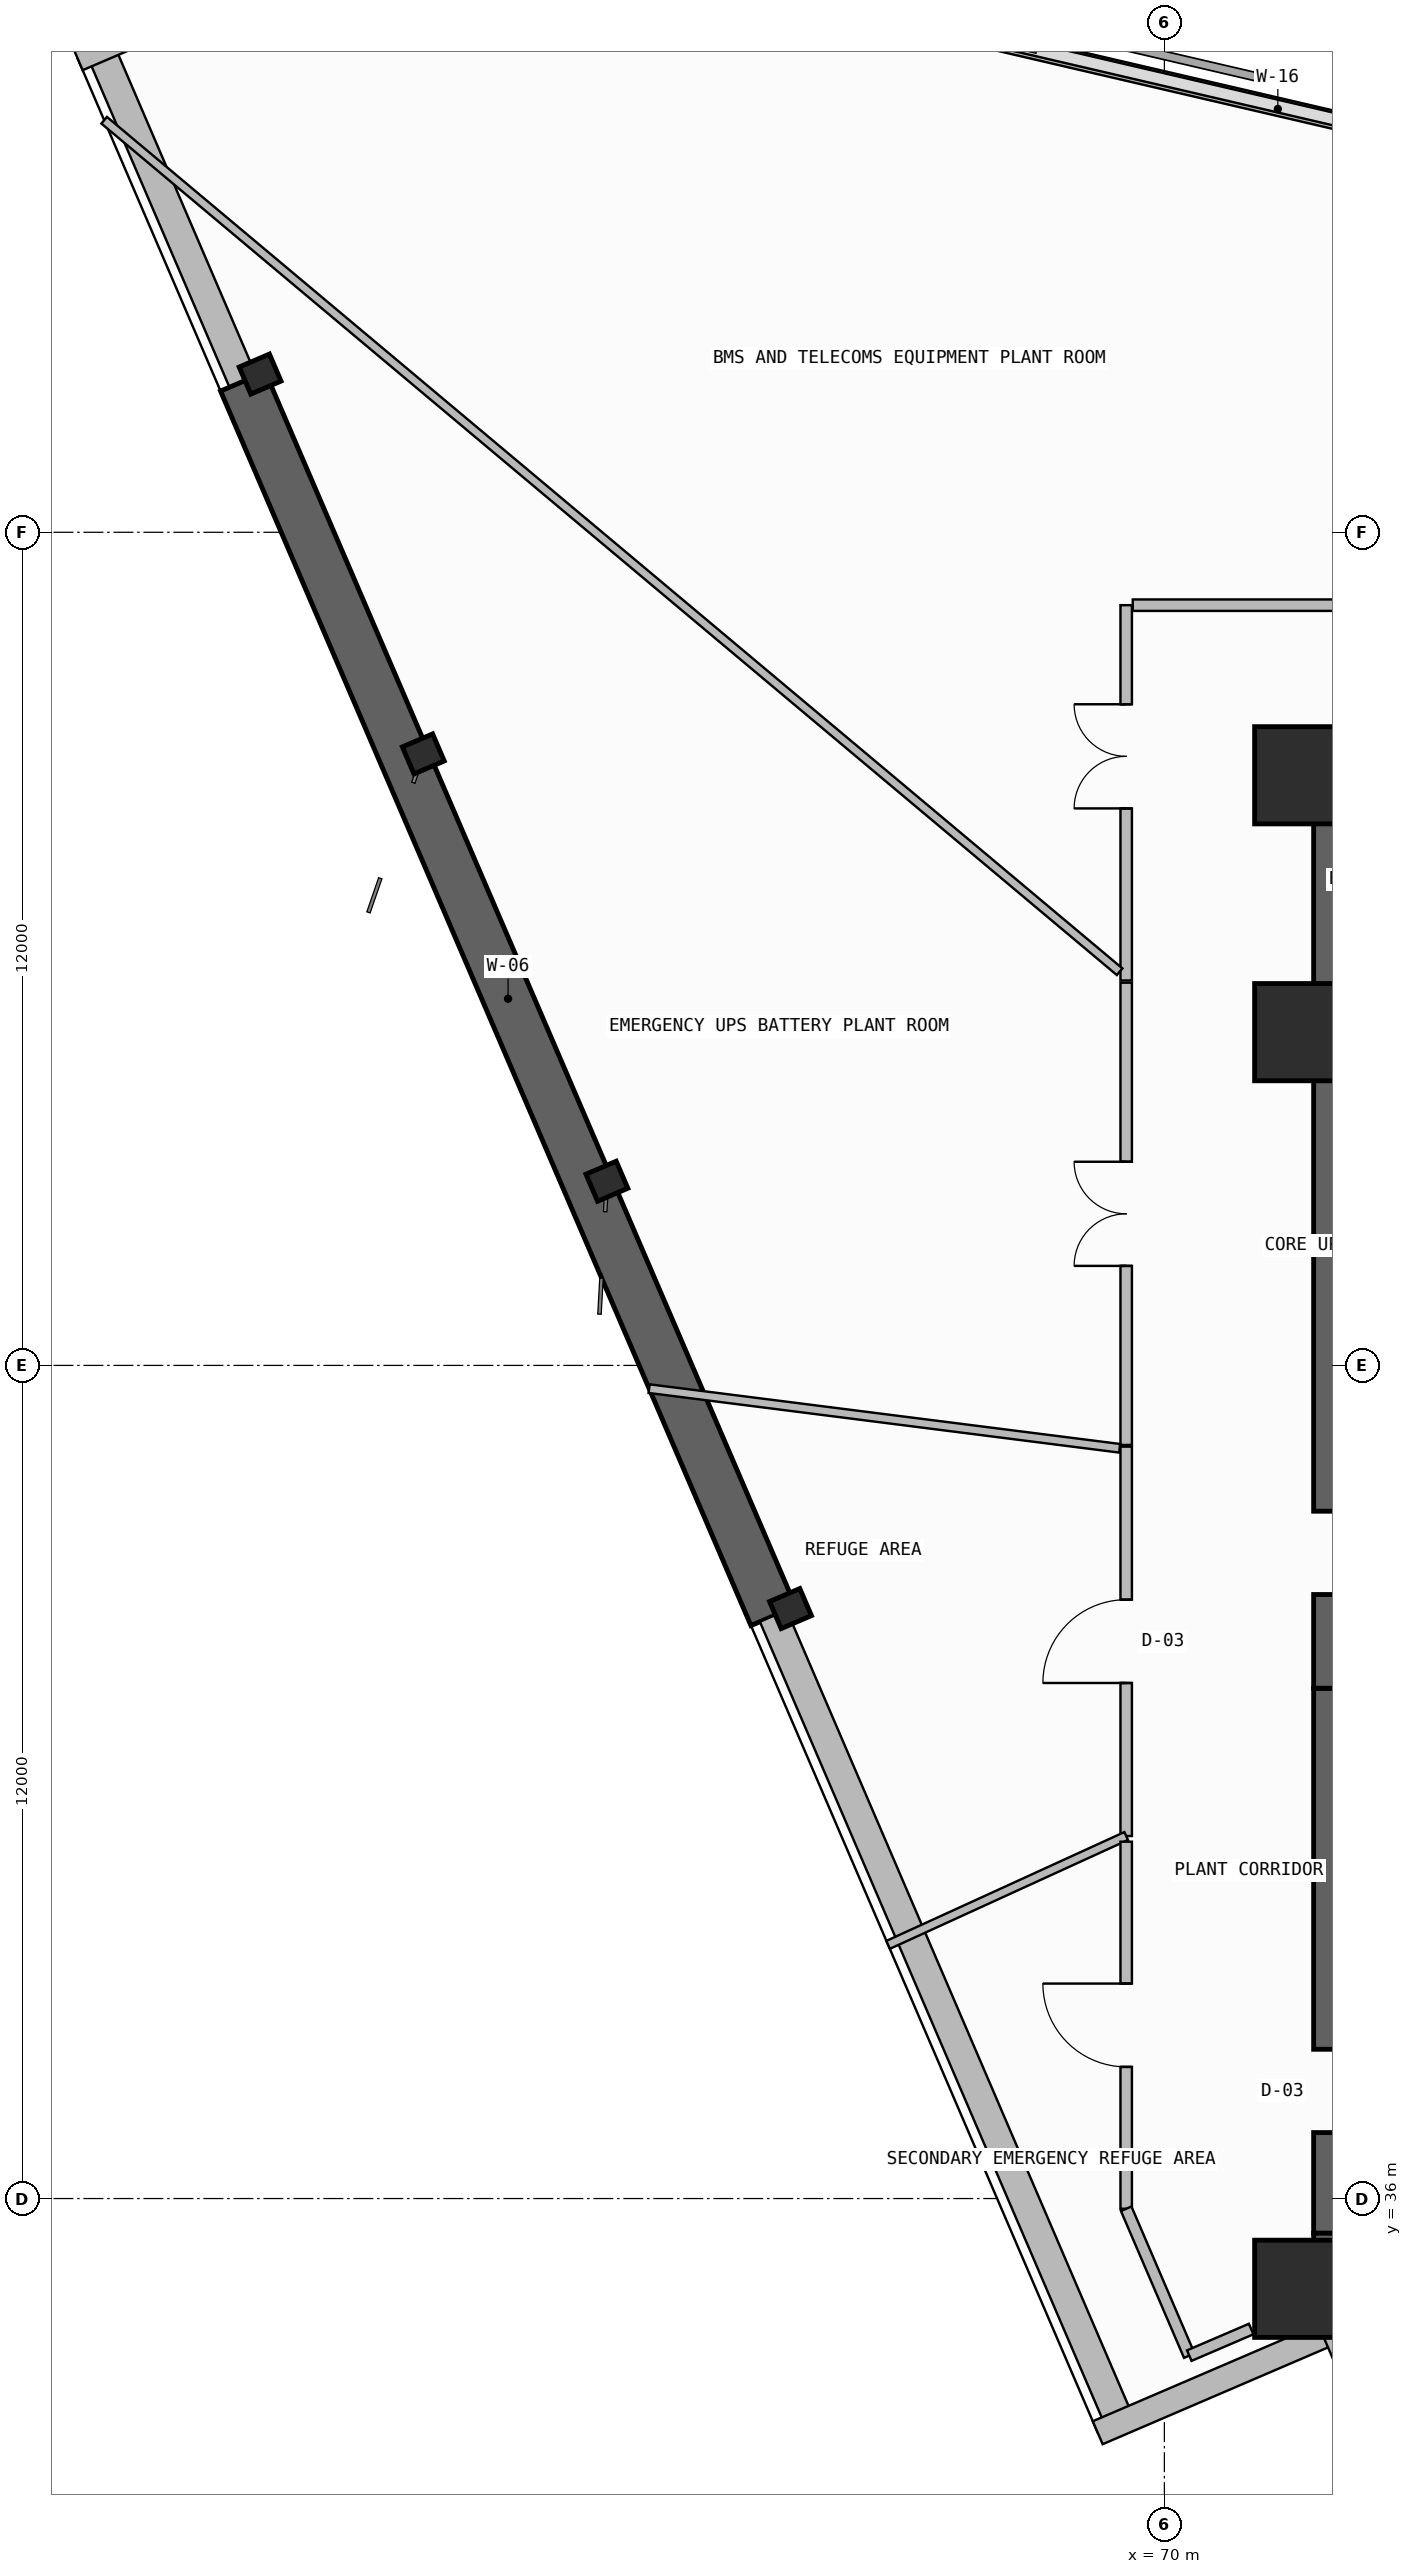
"""IFC4 building model, lengths in metres.
Left out: names, types, materials, properties, quantities, classifications, styles, units other than length and angle.
Written with IfcOpenShell. Run it as: python <this file> out.ifc"""

import sys

from ifc_helpers import new_model, si_unit, direction, frame, frame_2d, origin, origin_2d, place, context, subcontext, project, spatial, rectangle, i_section, extrude, element, fill, save


model = new_model("IFC4")
c1 = context("Model", 3, precision=1e-05, world=origin(), true_north=direction((0.0, 1.0)))
c2 = subcontext(c1, "Body", "Model", "MODEL_VIEW")
j1 = project(units=[si_unit("LENGTHUNIT", "METRE"), si_unit("PLANEANGLEUNIT", "RADIAN")], contexts=[c1])
p1 = place(None, origin())
s1 = spatial("IfcSite", under=j1, at=p1, CompositionType="ELEMENT")
p2 = place(p1, origin())
s2 = spatial("IfcBuilding", under=s1, at=p2, CompositionType="ELEMENT")
p3 = place(p2, frame((0.0, 0.0, 196.7)))
s3 = spatial("IfcBuildingStorey", under=s2, at=p3, CompositionType="ELEMENT", Elevation=196.7)
p4 = place(p3, frame((72.525, 35.5, -0.5), z_axis=(0.0, 0.0, 1.0), x_axis=(0.0, 1.0, 0.0)))
e1 = element("IfcWall", 1, at=p4, inside=s3, PredefinedType="SHEAR", context=c2, shape_type="SweptSolid", body=[
    extrude(rectangle(XDim=7.85, YDim=0.75, at=frame_2d((3.925, 0.0))), origin(), (0.0, 0.0, 1.0), 4.3),
])
p5 = place(p4, frame((1.45, 0.0, 0.5)))
e2 = element("IfcOpeningElement", 2, at=p5, cuts=e1, PredefinedType="OPENING", context=c2, shape_type="SweptSolid", body=[
    extrude(rectangle(XDim=1.2, YDim=2.2, at=frame_2d((0.6, 1.1))), frame((0.0, 0.385, 0.0), z_axis=(0.0, -1.0, 0.0), x_axis=(1.0, 0.0, 0.0)), (0.0, 0.0, 1.0), 0.77),
])
p6 = place(p3, frame((72.15, 35.125, -0.5), z_axis=(0.0, 0.0, 1.0), x_axis=(1.0, 0.0, 0.0)))
e3 = element("IfcWall", 3, at=p6, inside=s3, PredefinedType="SHEAR", context=c2, shape_type="SweptSolid", body=[
    extrude(rectangle(XDim=13.6, YDim=0.75, at=frame_2d((6.8, 0.0))), origin(), (0.0, 0.0, 1.0), 4.3),
])
p7 = place(p3, frame((72.525, 43.35, -0.5), z_axis=(0.0, 0.0, 1.0), x_axis=(0.0, 1.0, 0.0)))
e4 = element("IfcWall", 4, at=p7, inside=s3, PredefinedType="SHEAR", context=c2, shape_type="SweptSolid", body=[
    extrude(rectangle(XDim=12.7, YDim=0.75, at=frame_2d((6.35, 0.0))), origin(), (0.0, 0.0, 1.0), 4.3),
])
p8 = place(p7, frame((1.35, 0.0, 0.5)))
e5 = element("IfcOpeningElement", 5, at=p8, cuts=e4, PredefinedType="OPENING", context=c2, shape_type="SweptSolid", body=[
    extrude(rectangle(XDim=1.2, YDim=2.2, at=frame_2d((0.6, 1.1))), frame((0.0, 0.385, 0.0), z_axis=(0.0, -1.0, 0.0), x_axis=(1.0, 0.0, 0.0)), (0.0, 0.0, 1.0), 0.77),
])
p9 = place(p3, frame((72.0, 56.425, -0.5), z_axis=(0.0, 0.0, 1.0), x_axis=(1.0, 0.0, 0.0)))
e6 = element("IfcWall", 6, at=p9, inside=s3, PredefinedType="SHEAR", context=c2, shape_type="SweptSolid", body=[
    extrude(rectangle(XDim=13.75, YDim=0.75, at=frame_2d((6.875, 0.0))), origin(), (0.0, 0.0, 1.0), 4.3),
])
for number, where, z_axis, x_axis in (
    (7, (72.0, 34.7, 0.0), (0.0, 0.0, 1.0), (1.0, 0.0, 0.0)),
    (8, (72.0, 52.8, 0.0), (0.0, 0.0, 1.0), (1.0, 0.0, 0.0)),
    (9, (72.0, 56.5, 0.0), (0.0, 0.0, 1.0), (1.0, 0.0, 0.0)),
):
    element("IfcColumn", number, at=place(p3, frame(where, z_axis=z_axis, x_axis=x_axis)), inside=s3, PredefinedType="COLUMN", context=c2, shape_type="SweptSolid", body=[
        extrude(rectangle(XDim=1.4, YDim=1.4, at=origin_2d()), origin(), (0.0, 0.0, 1.0), 4.2),
    ])
for number, where, z_axis, x_axis in (
    (10, (56.976, 62.279, 0.0), (0.0, 0.0, 1.0), (-0.395, 0.919, 0.0)),
    (11, (59.326, 56.807, 0.0), (0.0, 0.0, 1.0), (-0.395, 0.919, 0.0)),
    (12, (61.97, 50.653, 0.0), (0.0, 0.0, 1.0), (-0.395, 0.919, 0.0)),
    (13, (64.615, 44.498, 0.0), (0.0, 0.0, 1.0), (-0.395, 0.919, 0.0)),
):
    element("IfcColumn", number, at=place(p3, frame(where, z_axis=z_axis, x_axis=x_axis)), inside=s3, PredefinedType="COLUMN", context=c2, shape_type="SweptSolid", body=[
        extrude(i_section(OverallWidth=0.424, OverallDepth=0.474, WebThickness=0.048, FlangeThickness=0.077, FilletRadius=0.015, at=origin_2d()), origin(), (0.0, 0.0, 1.0), 4.2),
    ])
p10 = place(p3, frame((54.671, 66.959, 0.0), z_axis=(0.0, 0.0, 1.0), x_axis=(0.394733507229, -0.918795656428, 0.0)))
e14 = element("IfcWall", 14, at=p10, inside=s3, PredefinedType="SOLIDWALL", context=c2, shape_type="SweptSolid", body=[
    extrude(rectangle(XDim=5.21, YDim=0.42, at=frame_2d((2.605, 0.0))), origin(), (0.0, 0.0, 1.0), 2.777),
])
p11 = place(p3, frame((56.728, 62.172, -0.5), z_axis=(0.0, 0.0, 1.0), x_axis=(0.394736752992, -0.918794261974, 0.0)))
e15 = element("IfcWall", 15, at=p11, inside=s3, PredefinedType="SHEAR", context=c2, shape_type="SweptSolid", body=[
    extrude(rectangle(XDim=19.353, YDim=0.7, at=frame_2d((9.676, 0.0))), origin(), (0.0, 0.0, 1.0), 4.3),
])
p12 = place(p3, frame((64.367, 44.391, 0.0), z_axis=(0.0, 0.0, 1.0), x_axis=(0.394757430431, -0.918785378159, 0.0)))
e16 = element("IfcWall", 16, at=p12, inside=s3, PredefinedType="SOLIDWALL", context=c2, shape_type="SweptSolid", body=[
    extrude(rectangle(XDim=12.654, YDim=0.42, at=frame_2d((6.327, 0.0))), origin(), (0.0, 0.0, 1.0), 2.777),
])
p13 = place(p3, frame((56.566, 67.773, 0.0), z_axis=(0.0, 0.0, 1.0), x_axis=(-0.918788830096, -0.394749396062, 0.0)))
e17 = element("IfcWall", 17, at=p13, inside=s3, PredefinedType="SOLIDWALL", context=c2, shape_type="SweptSolid", body=[
    extrude(rectangle(XDim=2.413, YDim=0.36, at=frame_2d((1.207, 0.0))), origin(), (0.0, 0.0, 1.0), 3.8),
])
p14 = place(p3, frame((69.04, 32.627, 0.0), z_axis=(0.0, 0.0, 1.0), x_axis=(0.91879775808, 0.394728615312, 0.0)))
e18 = element("IfcWall", 18, at=p14, inside=s3, PredefinedType="SOLIDWALL", context=c2, shape_type="SweptSolid", body=[
    extrude(rectangle(XDim=3.713, YDim=0.36, at=frame_2d((1.856, 0.0))), origin(), (0.0, 0.0, 1.0), 3.8),
])
p15 = place(p3, frame((72.451, 34.092, 0.0), z_axis=(0.0, 0.0, 1.0), x_axis=(0.394752464447, -0.918787511786, 0.0)))
e19 = element("IfcWall", 19, at=p15, inside=s3, PredefinedType="SOLIDWALL", context=c2, shape_type="SweptSolid", body=[
    extrude(rectangle(XDim=3.713, YDim=0.36, at=frame_2d((1.856, 0.0))), origin(), (0.0, 0.0, 1.0), 3.8),
])
p16 = place(p3, frame((87.165, 62.482, 0.0), z_axis=(0.0, 0.0, 1.0), x_axis=(-0.973958867717, 0.226724775876, 0.0)))
e20 = element("IfcWall", 20, at=p16, inside=s3, PredefinedType="PARAPET", context=c2, shape_type="SweptSolid", body=[
    extrude(rectangle(XDim=31.892, YDim=0.2, at=frame_2d((15.946, 0.0))), origin(), (0.0, 0.0, 1.0), 1.15),
])
p17 = place(p3, frame((69.45, 46.83, 0.0), z_axis=(0.0, 0.0, 1.0), x_axis=(0.0, -1.0, 0.0)))
e21 = element("IfcWall", 21, at=p17, inside=s3, PredefinedType="PARTITIONING", context=c2, shape_type="SweptSolid", body=[
    extrude(rectangle(XDim=5.608, YDim=0.165, at=frame_2d((2.804, 0.0))), origin(), (0.0, 0.0, 1.0), 3.8),
])
p18 = place(p17, frame((2.204, 0.0, 0.0)))
e22 = element("IfcOpeningElement", 22, at=p18, cuts=e21, PredefinedType="OPENING", context=c2, shape_type="SweptSolid", body=[
    extrude(rectangle(XDim=1.2, YDim=2.2, at=frame_2d((0.6, 1.1))), frame((0.0, 0.093, 0.0), z_axis=(0.0, -1.0, 0.0), x_axis=(1.0, 0.0, 0.0)), (0.0, 0.0, 1.0), 0.185),
])
p19 = place(p3, frame((69.45, 41.222, 0.0), z_axis=(0.0, 0.0, 1.0), x_axis=(-0.90943949501, -0.415836271766, 0.0)))
e23 = element("IfcWall", 23, at=p19, inside=s3, PredefinedType="PARTITIONING", context=c2, shape_type="SweptSolid", body=[
    extrude(rectangle(XDim=3.771, YDim=0.125, at=frame_2d((1.885, 0.0))), origin(), (0.0, 0.0, 1.0), 3.8),
])
p20 = place(p3, frame((62.579, 47.665, 0.0), z_axis=(0.0, 0.0, 1.0), x_axis=(0.99206305475, -0.125741383002, 0.0)))
e24 = element("IfcWall", 24, at=p20, inside=s3, PredefinedType="PARTITIONING", context=c2, shape_type="SweptSolid", body=[
    extrude(rectangle(XDim=6.831, YDim=0.125, at=frame_2d((3.415, 0.0))), origin(), (0.0, 0.0, 1.0), 2.777),
])
p21 = place(p3, frame((69.45, 41.14, 0.0), z_axis=(0.0, 0.0, 1.0), x_axis=(0.0, -1.0, 0.0)))
e25 = element("IfcWall", 25, at=p21, inside=s3, PredefinedType="PARTITIONING", context=c2, shape_type="SweptSolid", body=[
    extrude(rectangle(XDim=5.287, YDim=0.165, at=frame_2d((2.644, 0.0))), origin(), (0.0, 0.0, 1.0), 3.8),
])
p22 = place(p21, frame((2.043, 0.0, 0.0)))
e26 = element("IfcOpeningElement", 26, at=p22, cuts=e25, PredefinedType="OPENING", context=c2, shape_type="SweptSolid", body=[
    extrude(rectangle(XDim=1.2, YDim=2.2, at=frame_2d((0.6, 1.1))), frame((0.0, 0.093, 0.0), z_axis=(0.0, -1.0, 0.0), x_axis=(1.0, 0.0, 0.0)), (0.0, 0.0, 1.0), 0.185),
])
p23 = place(p3, frame((69.45, 35.853, 0.0), z_axis=(0.0, 0.0, 1.0), x_axis=(0.394712687444, -0.918804600756, 0.0)))
e27 = element("IfcWall", 27, at=p23, inside=s3, PredefinedType="PARTITIONING", context=c2, shape_type="SweptSolid", body=[
    extrude(rectangle(XDim=2.302, YDim=0.165, at=frame_2d((1.151, 0.0))), origin(), (0.0, 0.0, 1.0), 3.8),
])
p24 = place(p3, frame((70.359, 33.738, 0.0), z_axis=(0.0, 0.0, 1.0), x_axis=(0.918845364602, 0.394617784633, 0.0)))
e28 = element("IfcWall", 28, at=p24, inside=s3, PredefinedType="PARTITIONING", context=c2, shape_type="SweptSolid", body=[
    extrude(rectangle(XDim=0.97, YDim=0.165, at=frame_2d((0.485, 0.0))), origin(), (0.0, 0.0, 1.0), 3.8),
])
p25 = place(p3, frame((69.45, 58.95, 0.0), z_axis=(0.0, 0.0, 1.0), x_axis=(0.0, -1.0, 0.0)))
e29 = element("IfcWall", 29, at=p25, inside=s3, PredefinedType="PARTITIONING", context=c2, shape_type="SweptSolid", body=[
    extrude(rectangle(XDim=5.406, YDim=0.165, at=frame_2d((2.703, 0.0))), origin(), (0.0, 0.0, 1.0), 2.777),
])
p26 = place(p25, frame((1.427, 0.0, 0.0)))
e30 = element("IfcOpeningElement", 30, at=p26, cuts=e29, PredefinedType="OPENING", context=c2, shape_type="SweptSolid", body=[
    extrude(rectangle(XDim=1.5, YDim=2.25, at=frame_2d((0.75, 1.125))), frame((0.0, 0.093, 0.0), z_axis=(0.0, -1.0, 0.0), x_axis=(1.0, 0.0, 0.0)), (0.0, 0.0, 1.0), 0.185),
])
p27 = place(p3, frame((74.712, 58.95, 0.0), z_axis=(0.0, 0.0, 1.0), x_axis=(-1.0, 0.0, 0.0)))
e31 = element("IfcWall", 31, at=p27, inside=s3, PredefinedType="PARTITIONING", context=c2, shape_type="SweptSolid", body=[
    extrude(rectangle(XDim=5.167, YDim=0.165, at=frame_2d((2.583, 0.0))), origin(), (0.0, 0.0, 1.0), 2.777),
])
p28 = place(p3, frame((69.355, 53.67, 0.0), z_axis=(0.0, 0.0, 1.0), x_axis=(-0.766239280677, 0.642555339833, 0.0)))
e32 = element("IfcWall", 32, at=p28, inside=s3, PredefinedType="PARTITIONING", context=c2, shape_type="SweptSolid", body=[
    extrude(rectangle(XDim=19.088, YDim=0.125, at=frame_2d((9.544, 0.0))), origin(), (0.0, 0.0, 1.0), 2.777),
])
p29 = place(p3, frame((69.45, 53.512, 0.0), z_axis=(0.0, 0.0, 1.0), x_axis=(0.0, -1.0, 0.0)))
e33 = element("IfcWall", 33, at=p29, inside=s3, PredefinedType="PARTITIONING", context=c2, shape_type="SweptSolid", body=[
    extrude(rectangle(XDim=6.658, YDim=0.165, at=frame_2d((3.329, 0.0))), origin(), (0.0, 0.0, 1.0), 2.777),
])
p30 = place(p29, frame((2.579, 0.0, 0.0)))
e34 = element("IfcOpeningElement", 34, at=p30, cuts=e33, PredefinedType="OPENING", context=c2, shape_type="SweptSolid", body=[
    extrude(rectangle(XDim=1.5, YDim=2.25, at=frame_2d((0.75, 1.125))), frame((0.0, 0.093, 0.0), z_axis=(0.0, -1.0, 0.0), x_axis=(1.0, 0.0, 0.0)), (0.0, 0.0, 1.0), 0.185),
])
p31 = place(p18, frame((1.2, 0.0, 0.0), z_axis=(0.0, 0.0, 1.0), x_axis=(-1.0, 0.0, 0.0)))
e35 = element("IfcDoor", 35, at=p31, inside=s3, OperationType="SINGLE_SWING_LEFT", PredefinedType="USERDEFINED", context=c2, shape_type="SweptSolid", body=[
    extrude(rectangle(XDim=1.2, YDim=2.2, at=frame_2d((0.6, 1.1))), frame((0.0, 0.025, 0.0), z_axis=(0.0, -1.0, 0.0), x_axis=(1.0, 0.0, 0.0)), (0.0, 0.0, 1.0), 0.05),
])
fill(e22, e35)
p32 = place(p22, frame((1.2, 0.0, 0.0), z_axis=(0.0, 0.0, 1.0), x_axis=(-1.0, 0.0, 0.0)))
e36 = element("IfcDoor", 36, at=p32, inside=s3, OperationType="SINGLE_SWING_RIGHT", PredefinedType="USERDEFINED", context=c2, shape_type="SweptSolid", body=[
    extrude(rectangle(XDim=1.2, YDim=2.2, at=frame_2d((0.6, 1.1))), frame((0.0, 0.025, 0.0), z_axis=(0.0, -1.0, 0.0), x_axis=(1.0, 0.0, 0.0)), (0.0, 0.0, 1.0), 0.05),
])
fill(e26, e36)
p33 = place(p26, frame((1.5, 0.0, 0.0), z_axis=(0.0, 0.0, 1.0), x_axis=(-1.0, 0.0, 0.0)))
e37 = element("IfcDoor", 37, at=p33, inside=s3, OperationType="DOUBLE_DOOR_SINGLE_SWING", PredefinedType="DOOR", context=c2, shape_type="SweptSolid", body=[
    extrude(rectangle(XDim=1.5, YDim=2.25, at=frame_2d((0.75, 1.125))), frame((0.0, 0.025, 0.0), z_axis=(0.0, -1.0, 0.0), x_axis=(1.0, 0.0, 0.0)), (0.0, 0.0, 1.0), 0.05),
])
fill(e30, e37)
p34 = place(p30, frame((1.5, 0.0, 0.0), z_axis=(0.0, 0.0, 1.0), x_axis=(-1.0, 0.0, 0.0)))
e38 = element("IfcDoor", 38, at=p34, inside=s3, OperationType="DOUBLE_DOOR_SINGLE_SWING", PredefinedType="DOOR", context=c2, shape_type="SweptSolid", body=[
    extrude(rectangle(XDim=1.5, YDim=2.25, at=frame_2d((0.75, 1.125))), frame((0.0, 0.025, 0.0), z_axis=(0.0, -1.0, 0.0), x_axis=(1.0, 0.0, 0.0)), (0.0, 0.0, 1.0), 0.05),
])
fill(e34, e38)
save(model, sys.argv[1])
